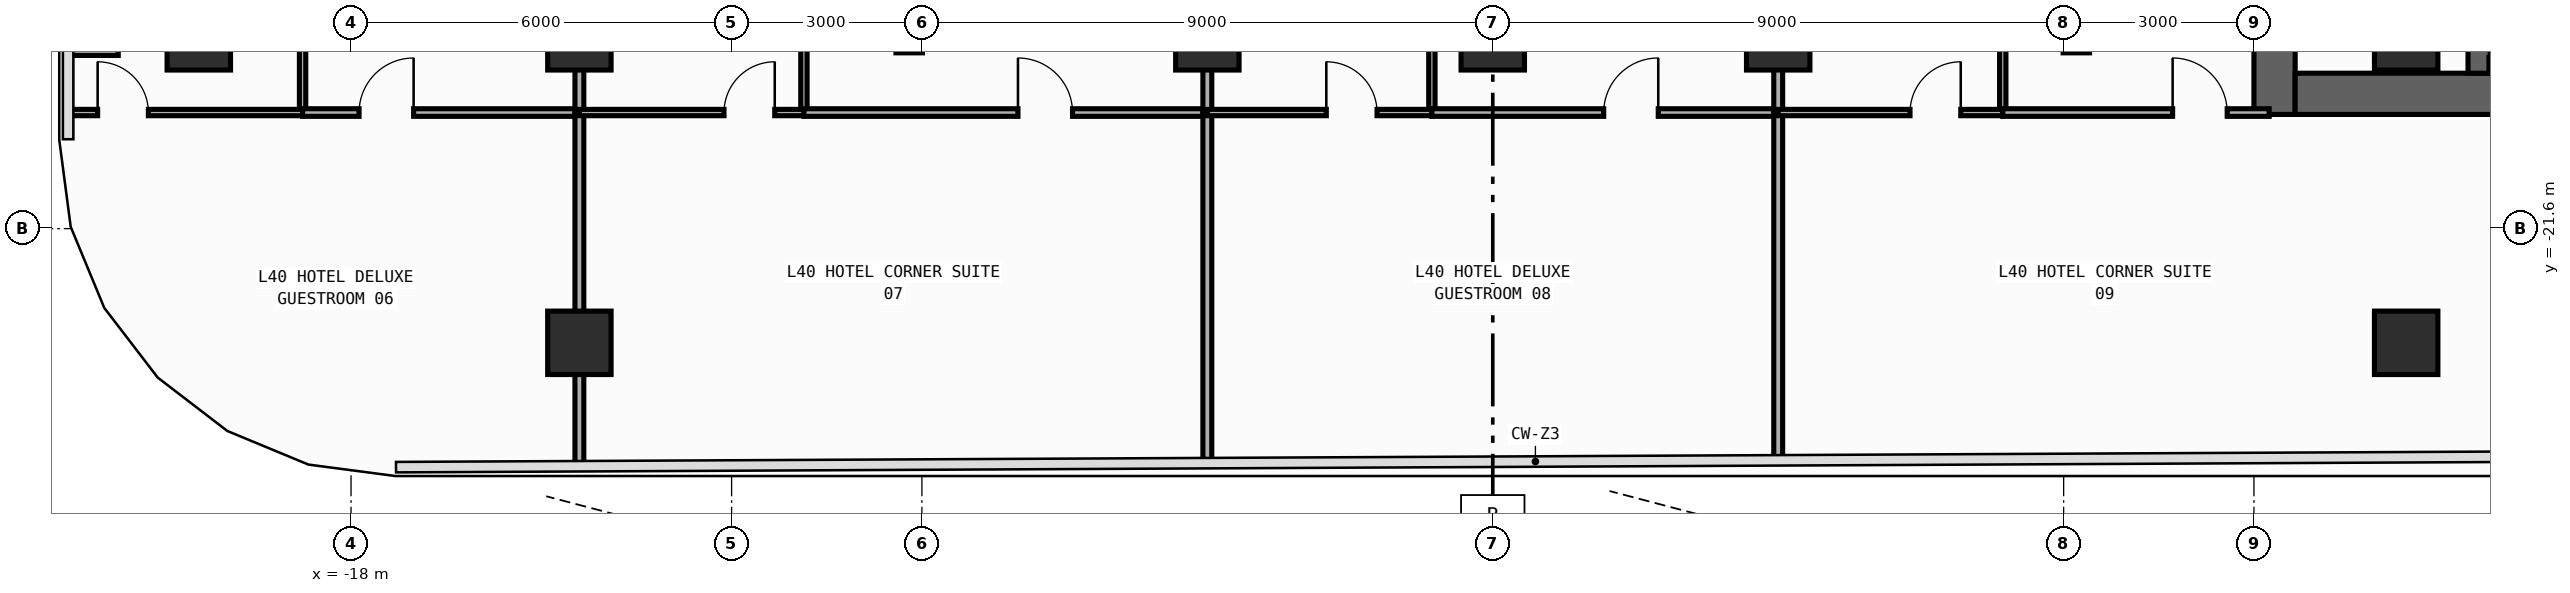
"""IFC4 building model, lengths in metres.
Left out: names, types, materials, properties, quantities, classifications, styles, units other than length and angle.
Written with IfcOpenShell. Run it as: python <this file> out.ifc"""

import sys

from ifc_helpers import new_model, si_unit, direction, frame, frame_2d, origin, origin_2d, place, context, subcontext, project, spatial, rectangle, extrude, element, fill, save


model = new_model("IFC4")
c1 = context("Model", 3, precision=1e-05, world=origin(), true_north=direction((0.0, 1.0)))
c2 = subcontext(c1, "Body", "Model", "MODEL_VIEW")
j1 = project(units=[si_unit("LENGTHUNIT", "METRE"), si_unit("PLANEANGLEUNIT", "RADIAN")], contexts=[c1])
p1 = place(None, origin())
s1 = spatial("IfcSite", under=j1, at=p1, CompositionType="ELEMENT")
p2 = place(p1, origin())
s2 = spatial("IfcBuilding", under=s1, at=p2, CompositionType="ELEMENT")
p3 = place(p2, frame((0.0, 0.0, 176.4)))
s3 = spatial("IfcBuildingStorey", under=s2, at=p3, CompositionType="ELEMENT", Elevation=176.4)
p4 = place(p3, frame((12.325, -19.8, 0.0), z_axis=(0.0, 0.0, 1.0), x_axis=(0.0, 1.0, 0.0)))
e1 = element("IfcWall", 1, at=p4, inside=s3, PredefinedType="SHEAR", context=c2, shape_type="SweptSolid", body=[
    extrude(rectangle(XDim=27.0, YDim=0.65, at=frame_2d((13.5, 0.0))), origin(), (0.0, 0.0, 1.0), 3.54),
])
p5 = place(p4, frame((23.05, 0.0, 0.0)))
e2 = element("IfcOpeningElement", 2, at=p5, cuts=e1, PredefinedType="OPENING", context=c2, shape_type="SweptSolid", body=[
    extrude(rectangle(XDim=1.1, YDim=2.2, at=frame_2d((0.55, 1.1))), frame((0.0, 0.335, 0.0), z_axis=(0.0, -1.0, 0.0), x_axis=(1.0, 0.0, 0.0)), (0.0, 0.0, 1.0), 0.67),
])
p6 = place(p4, frame((19.85, 0.0, 0.0)))
e3 = element("IfcOpeningElement", 3, at=p6, cuts=e1, PredefinedType="OPENING", context=c2, shape_type="SweptSolid", body=[
    extrude(rectangle(XDim=1.1, YDim=2.2, at=frame_2d((0.55, 1.1))), frame((0.0, 0.335, 0.0), z_axis=(0.0, -1.0, 0.0), x_axis=(1.0, 0.0, 0.0)), (0.0, 0.0, 1.0), 0.67),
])
p7 = place(p4, frame((16.65, 0.0, 0.0)))
e4 = element("IfcOpeningElement", 4, at=p7, cuts=e1, PredefinedType="OPENING", context=c2, shape_type="SweptSolid", body=[
    extrude(rectangle(XDim=1.1, YDim=2.2, at=frame_2d((0.55, 1.1))), frame((0.0, 0.335, 0.0), z_axis=(0.0, -1.0, 0.0), x_axis=(1.0, 0.0, 0.0)), (0.0, 0.0, 1.0), 0.67),
])
p8 = place(p4, frame((7.175, 0.0, 0.0)))
e5 = element("IfcOpeningElement", 5, at=p8, cuts=e1, PredefinedType="OPENING", context=c2, shape_type="SweptSolid", body=[
    extrude(rectangle(XDim=0.85, YDim=2.1, at=frame_2d((0.425, 1.05))), frame((0.0, 0.335, 0.0), z_axis=(0.0, -1.0, 0.0), x_axis=(1.0, 0.0, 0.0)), (0.0, 0.0, 1.0), 0.67),
])
p9 = place(p4, frame((10.375, 0.0, 0.0)))
e6 = element("IfcOpeningElement", 6, at=p9, cuts=e1, PredefinedType="OPENING", context=c2, shape_type="SweptSolid", body=[
    extrude(rectangle(XDim=0.85, YDim=2.1, at=frame_2d((0.425, 1.05))), frame((0.0, 0.335, 0.0), z_axis=(0.0, -1.0, 0.0), x_axis=(1.0, 0.0, 0.0)), (0.0, 0.0, 1.0), 0.67),
])
p10 = place(p4, frame((12.725, 0.0, 0.0)))
e7 = element("IfcOpeningElement", 7, at=p10, cuts=e1, PredefinedType="OPENING", context=c2, shape_type="SweptSolid", body=[
    extrude(rectangle(XDim=1.15, YDim=2.2, at=frame_2d((0.575, 1.1))), frame((0.0, 0.335, 0.0), z_axis=(0.0, -1.0, 0.0), x_axis=(1.0, 0.0, 0.0)), (0.0, 0.0, 1.0), 0.67),
])
p11 = place(p4, frame((25.125, 0.0, 0.0)))
e8 = element("IfcOpeningElement", 8, at=p11, cuts=e1, PredefinedType="OPENING", context=c2, shape_type="SweptSolid", body=[
    extrude(rectangle(XDim=0.85, YDim=2.1, at=frame_2d((0.425, 1.05))), frame((0.0, 0.335, 0.0), z_axis=(0.0, -1.0, 0.0), x_axis=(1.0, 0.0, 0.0)), (0.0, 0.0, 1.0), 0.67),
])
p12 = place(p3, frame((12.65, -19.475, 0.0), z_axis=(0.0, 0.0, 1.0), x_axis=(1.0, 0.0, 0.0)))
e9 = element("IfcWall", 9, at=p12, inside=s3, PredefinedType="SHEAR", context=c2, shape_type="SweptSolid", body=[
    extrude(rectangle(XDim=7.1, YDim=0.65, at=frame_2d((3.55, 0.0))), origin(), (0.0, 0.0, 1.0), 3.54),
])
p13 = place(p3, frame((15.55, -19.15, 0.0), z_axis=(0.0, 0.0, 1.0), x_axis=(0.0, 1.0, 0.0)))
e10 = element("IfcWall", 10, at=p13, inside=s3, PredefinedType="SHEAR", context=c2, shape_type="SweptSolid", body=[
    extrude(rectangle(XDim=25.7, YDim=0.35, at=frame_2d((12.85, 0.0))), origin(), (0.0, 0.0, 1.0), 3.54),
])
p14 = place(p13, frame((12.075, 0.0, 0.0)))
e11 = element("IfcOpeningElement", 11, at=p14, cuts=e10, PredefinedType="OPENING", context=c2, shape_type="SweptSolid", body=[
    extrude(rectangle(XDim=1.15, YDim=2.2, at=frame_2d((0.575, 1.1))), frame((0.0, 0.185, 0.0), z_axis=(0.0, -1.0, 0.0), x_axis=(1.0, 0.0, 0.0)), (0.0, 0.0, 1.0), 0.37),
])
p15 = place(p13, frame((24.475, 0.0, 0.0)))
e12 = element("IfcOpeningElement", 12, at=p15, cuts=e10, PredefinedType="OPENING", context=c2, shape_type="SweptSolid", body=[
    extrude(rectangle(XDim=0.85, YDim=2.1, at=frame_2d((0.425, 1.05))), frame((0.0, 0.185, 0.0), z_axis=(0.0, -1.0, 0.0), x_axis=(1.0, 0.0, 0.0)), (0.0, 0.0, 1.0), 0.37),
])
p16 = place(p3, frame((15.705, -19.01, 0.0), z_axis=(0.0, 0.0, 1.0), x_axis=(1.0, 0.0, 0.0)))
e13 = element("IfcWall", 13, at=p16, inside=s3, PredefinedType="SHEAR", context=c2, shape_type="SweptSolid", body=[
    extrude(rectangle(XDim=4.065, YDim=0.22, at=frame_2d((2.032, 0.0))), origin(), (0.0, 0.0, 1.0), 3.54),
])
for number, where, z_axis, x_axis in (
    (14, (-20.4, -18.6, 0.0), (0.0, 0.0, 1.0), (1.0, 0.0, 0.0)),
    (15, (-14.4, -18.6, 0.0), (0.0, 0.0, 1.0), (1.0, 0.0, 0.0)),
    (16, (14.4, -18.6, 0.0), (0.0, 0.0, 1.0), (1.0, 0.0, 0.0)),
    (17, (-4.5, -18.6, 0.0), (0.0, 0.0, 1.0), (1.0, 0.0, 0.0)),
    (18, (0.0, -18.6, 0.0), (0.0, 0.0, 1.0), (1.0, 0.0, 0.0)),
    (19, (4.5, -18.6, 0.0), (0.0, 0.0, 1.0), (1.0, 0.0, 0.0)),
    (20, (-14.4, -23.4, 0.0), (0.0, 0.0, 1.0), (1.0, 0.0, 0.0)),
    (21, (14.4, -23.4, 0.0), (0.0, 0.0, 1.0), (1.0, 0.0, 0.0)),
):
    element("IfcColumn", number, at=place(p3, frame(where, z_axis=z_axis, x_axis=x_axis)), inside=s3, PredefinedType="COLUMN", context=c2, shape_type="SweptSolid", body=[
        extrude(rectangle(XDim=1.0, YDim=1.0, at=origin_2d()), origin(), (0.0, 0.0, 1.0), 3.8),
    ])
p17 = place(p3, frame((-18.764, -19.72, 0.0), z_axis=(0.0, 0.0, 1.0), x_axis=(0.0, 1.0, 0.0)))
e22 = element("IfcWall", 22, at=p17, inside=s3, PredefinedType="PARTITIONING", context=c2, shape_type="SweptSolid", body=[
    extrude(rectangle(XDim=2.965, YDim=0.1, at=frame_2d((1.482, 0.0))), origin(), (0.0, 0.0, 1.0), 3.54),
])
p18 = place(p3, frame((-22.455, -19.77, 0.0), z_axis=(0.0, 0.0, 1.0), x_axis=(1.0, 0.0, 0.0)))
e23 = element("IfcWall", 23, at=p18, inside=s3, PredefinedType="PARTITIONING", context=c2, shape_type="SweptSolid", body=[
    extrude(rectangle(XDim=3.691, YDim=0.1, at=frame_2d((1.846, 0.0))), origin(), (0.0, 0.0, 1.0), 3.54),
])
p19 = place(p18, frame((0.46, 0.0, 0.0)))
e24 = element("IfcOpeningElement", 24, at=p19, cuts=e23, PredefinedType="OPENING", context=c2, shape_type="SweptSolid", body=[
    extrude(rectangle(XDim=0.8, YDim=2.1, at=frame_2d((0.4, 1.05))), frame((0.0, 0.06, 0.0), z_axis=(0.0, -1.0, 0.0), x_axis=(1.0, 0.0, 0.0)), (0.0, 0.0, 1.0), 0.12),
])
p20 = place(p3, frame((-18.764, -19.77, 0.0), z_axis=(0.0, 0.0, 1.0), x_axis=(1.0, 0.0, 0.0)))
e25 = element("IfcWall", 25, at=p20, inside=s3, PredefinedType="PARTITIONING", context=c2, shape_type="SweptSolid", body=[
    extrude(rectangle(XDim=4.364, YDim=0.12, at=frame_2d((2.182, 0.0))), origin(), (0.0, 0.0, 1.0), 3.54),
])
p21 = place(p20, frame((0.891, 0.0, 0.0)))
e26 = element("IfcOpeningElement", 26, at=p21, cuts=e25, PredefinedType="OPENING", context=c2, shape_type="SweptSolid", body=[
    extrude(rectangle(XDim=0.86, YDim=2.15, at=frame_2d((0.43, 1.075))), frame((0.0, 0.07, 0.0), z_axis=(0.0, -1.0, 0.0), x_axis=(1.0, 0.0, 0.0)), (0.0, 0.0, 1.0), 0.14),
])
p22 = place(p3, frame((-14.4, -19.77, 0.0), z_axis=(0.0, 0.0, 1.0), x_axis=(0.0, 1.0, 0.0)))
e27 = element("IfcWall", 27, at=p22, inside=s3, PredefinedType="PARTITIONING", context=c2, shape_type="SweptSolid", body=[
    extrude(rectangle(XDim=3.015, YDim=0.14, at=frame_2d((1.508, 0.0))), origin(), (0.0, 0.0, 1.0), 2.952),
])
p23 = place(p3, frame((-14.4, -25.341, 0.0), z_axis=(0.0, 0.0, 1.0), x_axis=(0.0, 1.0, 0.0)))
e28 = element("IfcWall", 28, at=p23, inside=s3, PredefinedType="PARTITIONING", context=c2, shape_type="SweptSolid", body=[
    extrude(rectangle(XDim=5.571, YDim=0.14, at=frame_2d((2.785, 0.0))), origin(), (0.0, 0.0, 1.0), 2.952),
])
p24 = place(p3, frame((-10.86, -19.72, 0.0), z_axis=(0.0, 0.0, 1.0), x_axis=(0.0, 1.0, 0.0)))
e29 = element("IfcWall", 29, at=p24, inside=s3, PredefinedType="PARTITIONING", context=c2, shape_type="SweptSolid", body=[
    extrude(rectangle(XDim=2.965, YDim=0.1, at=frame_2d((1.482, 0.0))), origin(), (0.0, 0.0, 1.0), 3.54),
])
p25 = place(p24, frame((1.705, 0.0, 0.0)))
e30 = element("IfcOpeningElement", 30, at=p25, cuts=e29, PredefinedType="OPENING", context=c2, shape_type="SweptSolid", body=[
    extrude(rectangle(XDim=0.8, YDim=2.1, at=frame_2d((0.4, 1.05))), frame((0.0, 0.06, 0.0), z_axis=(0.0, -1.0, 0.0), x_axis=(1.0, 0.0, 0.0)), (0.0, 0.0, 1.0), 0.12),
])
p26 = place(p3, frame((-14.4, -19.77, 0.0), z_axis=(0.0, 0.0, 1.0), x_axis=(1.0, 0.0, 0.0)))
e31 = element("IfcWall", 31, at=p26, inside=s3, PredefinedType="PARTITIONING", context=c2, shape_type="SweptSolid", body=[
    extrude(rectangle(XDim=3.54, YDim=0.1, at=frame_2d((1.77, 0.0))), origin(), (0.0, 0.0, 1.0), 3.54),
])
p27 = place(p26, frame((2.28, 0.0, 0.0)))
e32 = element("IfcOpeningElement", 32, at=p27, cuts=e31, PredefinedType="OPENING", context=c2, shape_type="SweptSolid", body=[
    extrude(rectangle(XDim=0.8, YDim=2.1, at=frame_2d((0.4, 1.05))), frame((0.0, 0.06, 0.0), z_axis=(0.0, -1.0, 0.0), x_axis=(1.0, 0.0, 0.0)), (0.0, 0.0, 1.0), 0.12),
])
p28 = place(p3, frame((-10.86, -19.77, 0.0), z_axis=(0.0, 0.0, 1.0), x_axis=(1.0, 0.0, 0.0)))
e33 = element("IfcWall", 33, at=p28, inside=s3, PredefinedType="PARTITIONING", context=c2, shape_type="SweptSolid", body=[
    extrude(rectangle(XDim=6.36, YDim=0.12, at=frame_2d((3.18, 0.0))), origin(), (0.0, 0.0, 1.0), 3.54),
])
p29 = place(p28, frame((3.375, 0.0, 0.0)))
e34 = element("IfcOpeningElement", 34, at=p29, cuts=e33, PredefinedType="OPENING", context=c2, shape_type="SweptSolid", body=[
    extrude(rectangle(XDim=0.86, YDim=2.15, at=frame_2d((0.43, 1.075))), frame((0.0, 0.07, 0.0), z_axis=(0.0, -1.0, 0.0), x_axis=(1.0, 0.0, 0.0)), (0.0, 0.0, 1.0), 0.14),
])
p30 = place(p3, frame((-4.5, -19.77, 0.0), z_axis=(0.0, 0.0, 1.0), x_axis=(0.0, 1.0, 0.0)))
e35 = element("IfcWall", 35, at=p30, inside=s3, PredefinedType="PARTITIONING", context=c2, shape_type="SweptSolid", body=[
    extrude(rectangle(XDim=3.015, YDim=0.14, at=frame_2d((1.508, 0.0))), origin(), (0.0, 0.0, 1.0), 3.54),
])
p31 = place(p3, frame((-4.5, -25.292, 0.0), z_axis=(0.0, 0.0, 1.0), x_axis=(0.0, 1.0, 0.0)))
e36 = element("IfcWall", 36, at=p31, inside=s3, PredefinedType="PARTITIONING", context=c2, shape_type="SweptSolid", body=[
    extrude(rectangle(XDim=5.522, YDim=0.14, at=frame_2d((2.761, 0.0))), origin(), (0.0, 0.0, 1.0), 3.54),
])
p32 = place(p3, frame((-0.96, -19.72, 0.0), z_axis=(0.0, 0.0, 1.0), x_axis=(0.0, 1.0, 0.0)))
e37 = element("IfcWall", 37, at=p32, inside=s3, PredefinedType="PARTITIONING", context=c2, shape_type="SweptSolid", body=[
    extrude(rectangle(XDim=2.965, YDim=0.1, at=frame_2d((1.482, 0.0))), origin(), (0.0, 0.0, 1.0), 3.54),
])
p33 = place(p3, frame((-4.5, -19.77, 0.0), z_axis=(0.0, 0.0, 1.0), x_axis=(1.0, 0.0, 0.0)))
e38 = element("IfcWall", 38, at=p33, inside=s3, PredefinedType="PARTITIONING", context=c2, shape_type="SweptSolid", body=[
    extrude(rectangle(XDim=3.54, YDim=0.1, at=frame_2d((1.77, 0.0))), origin(), (0.0, 0.0, 1.0), 3.54),
])
p34 = place(p33, frame((1.875, 0.0, 0.0)))
e39 = element("IfcOpeningElement", 39, at=p34, cuts=e38, PredefinedType="OPENING", context=c2, shape_type="SweptSolid", body=[
    extrude(rectangle(XDim=0.8, YDim=2.1, at=frame_2d((0.4, 1.05))), frame((0.0, 0.06, 0.0), z_axis=(0.0, -1.0, 0.0), x_axis=(1.0, 0.0, 0.0)), (0.0, 0.0, 1.0), 0.12),
])
p35 = place(p3, frame((-0.96, -19.77, 0.0), z_axis=(0.0, 0.0, 1.0), x_axis=(1.0, 0.0, 0.0)))
e40 = element("IfcWall", 40, at=p35, inside=s3, PredefinedType="PARTITIONING", context=c2, shape_type="SweptSolid", body=[
    extrude(rectangle(XDim=5.46, YDim=0.12, at=frame_2d((2.73, 0.0))), origin(), (0.0, 0.0, 1.0), 3.54),
])
p36 = place(p35, frame((2.709, 0.0, 0.0)))
e41 = element("IfcOpeningElement", 41, at=p36, cuts=e40, PredefinedType="OPENING", context=c2, shape_type="SweptSolid", body=[
    extrude(rectangle(XDim=0.86, YDim=2.15, at=frame_2d((0.43, 1.075))), frame((0.0, 0.07, 0.0), z_axis=(0.0, -1.0, 0.0), x_axis=(1.0, 0.0, 0.0)), (0.0, 0.0, 1.0), 0.14),
])
p37 = place(p3, frame((4.5, -19.77, 0.0), z_axis=(0.0, 0.0, 1.0), x_axis=(0.0, 1.0, 0.0)))
e42 = element("IfcWall", 42, at=p37, inside=s3, PredefinedType="PARTITIONING", context=c2, shape_type="SweptSolid", body=[
    extrude(rectangle(XDim=3.015, YDim=0.14, at=frame_2d((1.508, 0.0))), origin(), (0.0, 0.0, 1.0), 3.54),
])
p38 = place(p3, frame((4.5, -25.248, 0.0), z_axis=(0.0, 0.0, 1.0), x_axis=(0.0, 1.0, 0.0)))
e43 = element("IfcWall", 43, at=p38, inside=s3, PredefinedType="PARTITIONING", context=c2, shape_type="SweptSolid", body=[
    extrude(rectangle(XDim=5.478, YDim=0.14, at=frame_2d((2.739, 0.0))), origin(), (0.0, 0.0, 1.0), 3.54),
])
p39 = place(p3, frame((8.04, -19.72, 0.0), z_axis=(0.0, 0.0, 1.0), x_axis=(0.0, 1.0, 0.0)))
e44 = element("IfcWall", 44, at=p39, inside=s3, PredefinedType="PARTITIONING", context=c2, shape_type="SweptSolid", body=[
    extrude(rectangle(XDim=2.965, YDim=0.1, at=frame_2d((1.482, 0.0))), origin(), (0.0, 0.0, 1.0), 3.54),
])
p40 = place(p39, frame((1.705, 0.0, 0.0)))
e45 = element("IfcOpeningElement", 45, at=p40, cuts=e44, PredefinedType="OPENING", context=c2, shape_type="SweptSolid", body=[
    extrude(rectangle(XDim=0.8, YDim=2.1, at=frame_2d((0.4, 1.05))), frame((0.0, 0.06, 0.0), z_axis=(0.0, -1.0, 0.0), x_axis=(1.0, 0.0, 0.0)), (0.0, 0.0, 1.0), 0.12),
])
p41 = place(p3, frame((4.5, -19.77, 0.0), z_axis=(0.0, 0.0, 1.0), x_axis=(1.0, 0.0, 0.0)))
e46 = element("IfcWall", 46, at=p41, inside=s3, PredefinedType="PARTITIONING", context=c2, shape_type="SweptSolid", body=[
    extrude(rectangle(XDim=3.54, YDim=0.1, at=frame_2d((1.77, 0.0))), origin(), (0.0, 0.0, 1.0), 3.54),
])
p42 = place(p41, frame((2.078, 0.0, 0.0)))
e47 = element("IfcOpeningElement", 47, at=p42, cuts=e46, PredefinedType="OPENING", context=c2, shape_type="SweptSolid", body=[
    extrude(rectangle(XDim=0.8, YDim=2.1, at=frame_2d((0.4, 1.05))), frame((0.0, 0.06, 0.0), z_axis=(0.0, -1.0, 0.0), x_axis=(1.0, 0.0, 0.0)), (0.0, 0.0, 1.0), 0.12),
])
p43 = place(p3, frame((8.04, -19.77, 0.0), z_axis=(0.0, 0.0, 1.0), x_axis=(1.0, 0.0, 0.0)))
e48 = element("IfcWall", 48, at=p43, inside=s3, PredefinedType="PARTITIONING", context=c2, shape_type="SweptSolid", body=[
    extrude(rectangle(XDim=4.2, YDim=0.12, at=frame_2d((2.1, 0.0))), origin(), (0.0, 0.0, 1.0), 3.54),
])
p44 = place(p43, frame((2.678, 0.0, 0.0)))
e49 = element("IfcOpeningElement", 49, at=p44, cuts=e48, PredefinedType="OPENING", context=c2, shape_type="SweptSolid", body=[
    extrude(rectangle(XDim=0.86, YDim=2.15, at=frame_2d((0.43, 1.075))), frame((0.0, 0.07, 0.0), z_axis=(0.0, -1.0, 0.0), x_axis=(1.0, 0.0, 0.0)), (0.0, 0.0, 1.0), 0.14),
])
p45 = place(p3, frame((-21.67, -18.82, 0.0), z_axis=(0.0, 0.0, 1.0), x_axis=(-1.0, 0.0, 0.0)))
e50 = element("IfcWall", 50, at=p45, inside=s3, PredefinedType="PARTITIONING", context=c2, shape_type="SweptSolid", body=[
    extrude(rectangle(XDim=0.785, YDim=0.1, at=frame_2d((0.393, 0.0))), origin(), (0.0, 0.0, 1.0), 3.54),
])
p46 = place(p19, origin())
e51 = element("IfcDoor", 51, at=p46, inside=s3, OperationType="SINGLE_SWING_LEFT", PredefinedType="DOOR", context=c2, shape_type="SweptSolid", body=[
    extrude(rectangle(XDim=0.8, YDim=2.1, at=frame_2d((0.4, 1.05))), frame((0.0, 0.025, 0.0), z_axis=(0.0, -1.0, 0.0), x_axis=(1.0, 0.0, 0.0)), (0.0, 0.0, 1.0), 0.05),
])
fill(e24, e51)
p47 = place(p21, origin())
e52 = element("IfcDoor", 52, at=p47, inside=s3, OperationType="SINGLE_SWING_RIGHT", PredefinedType="DOOR", context=c2, shape_type="SweptSolid", body=[
    extrude(rectangle(XDim=0.86, YDim=2.15, at=frame_2d((0.43, 1.075))), frame((0.0, 0.025, 0.0), z_axis=(0.0, -1.0, 0.0), x_axis=(1.0, 0.0, 0.0)), (0.0, 0.0, 1.0), 0.05),
])
fill(e26, e52)
p48 = place(p27, origin())
e53 = element("IfcDoor", 53, at=p48, inside=s3, OperationType="SINGLE_SWING_RIGHT", PredefinedType="DOOR", context=c2, shape_type="SweptSolid", body=[
    extrude(rectangle(XDim=0.8, YDim=2.1, at=frame_2d((0.4, 1.05))), frame((0.0, 0.025, 0.0), z_axis=(0.0, -1.0, 0.0), x_axis=(1.0, 0.0, 0.0)), (0.0, 0.0, 1.0), 0.05),
])
fill(e32, e53)
p49 = place(p29, origin())
e54 = element("IfcDoor", 54, at=p49, inside=s3, OperationType="SINGLE_SWING_LEFT", PredefinedType="DOOR", context=c2, shape_type="SweptSolid", body=[
    extrude(rectangle(XDim=0.86, YDim=2.15, at=frame_2d((0.43, 1.075))), frame((0.0, 0.025, 0.0), z_axis=(0.0, -1.0, 0.0), x_axis=(1.0, 0.0, 0.0)), (0.0, 0.0, 1.0), 0.05),
])
fill(e34, e54)
p50 = place(p34, origin())
e55 = element("IfcDoor", 55, at=p50, inside=s3, OperationType="SINGLE_SWING_LEFT", PredefinedType="DOOR", context=c2, shape_type="SweptSolid", body=[
    extrude(rectangle(XDim=0.8, YDim=2.1, at=frame_2d((0.4, 1.05))), frame((0.0, 0.025, 0.0), z_axis=(0.0, -1.0, 0.0), x_axis=(1.0, 0.0, 0.0)), (0.0, 0.0, 1.0), 0.05),
])
fill(e39, e55)
p51 = place(p36, origin())
e56 = element("IfcDoor", 56, at=p51, inside=s3, OperationType="SINGLE_SWING_RIGHT", PredefinedType="DOOR", context=c2, shape_type="SweptSolid", body=[
    extrude(rectangle(XDim=0.86, YDim=2.15, at=frame_2d((0.43, 1.075))), frame((0.0, 0.025, 0.0), z_axis=(0.0, -1.0, 0.0), x_axis=(1.0, 0.0, 0.0)), (0.0, 0.0, 1.0), 0.05),
])
fill(e41, e56)
p52 = place(p42, origin())
e57 = element("IfcDoor", 57, at=p52, inside=s3, OperationType="SINGLE_SWING_RIGHT", PredefinedType="DOOR", context=c2, shape_type="SweptSolid", body=[
    extrude(rectangle(XDim=0.8, YDim=2.1, at=frame_2d((0.4, 1.05))), frame((0.0, 0.025, 0.0), z_axis=(0.0, -1.0, 0.0), x_axis=(1.0, 0.0, 0.0)), (0.0, 0.0, 1.0), 0.05),
])
fill(e47, e57)
p53 = place(p44, origin())
e58 = element("IfcDoor", 58, at=p53, inside=s3, OperationType="SINGLE_SWING_LEFT", PredefinedType="DOOR", context=c2, shape_type="SweptSolid", body=[
    extrude(rectangle(XDim=0.86, YDim=2.15, at=frame_2d((0.43, 1.075))), frame((0.0, 0.025, 0.0), z_axis=(0.0, -1.0, 0.0), x_axis=(1.0, 0.0, 0.0)), (0.0, 0.0, 1.0), 0.05),
])
fill(e49, e58)
save(model, sys.argv[1])
